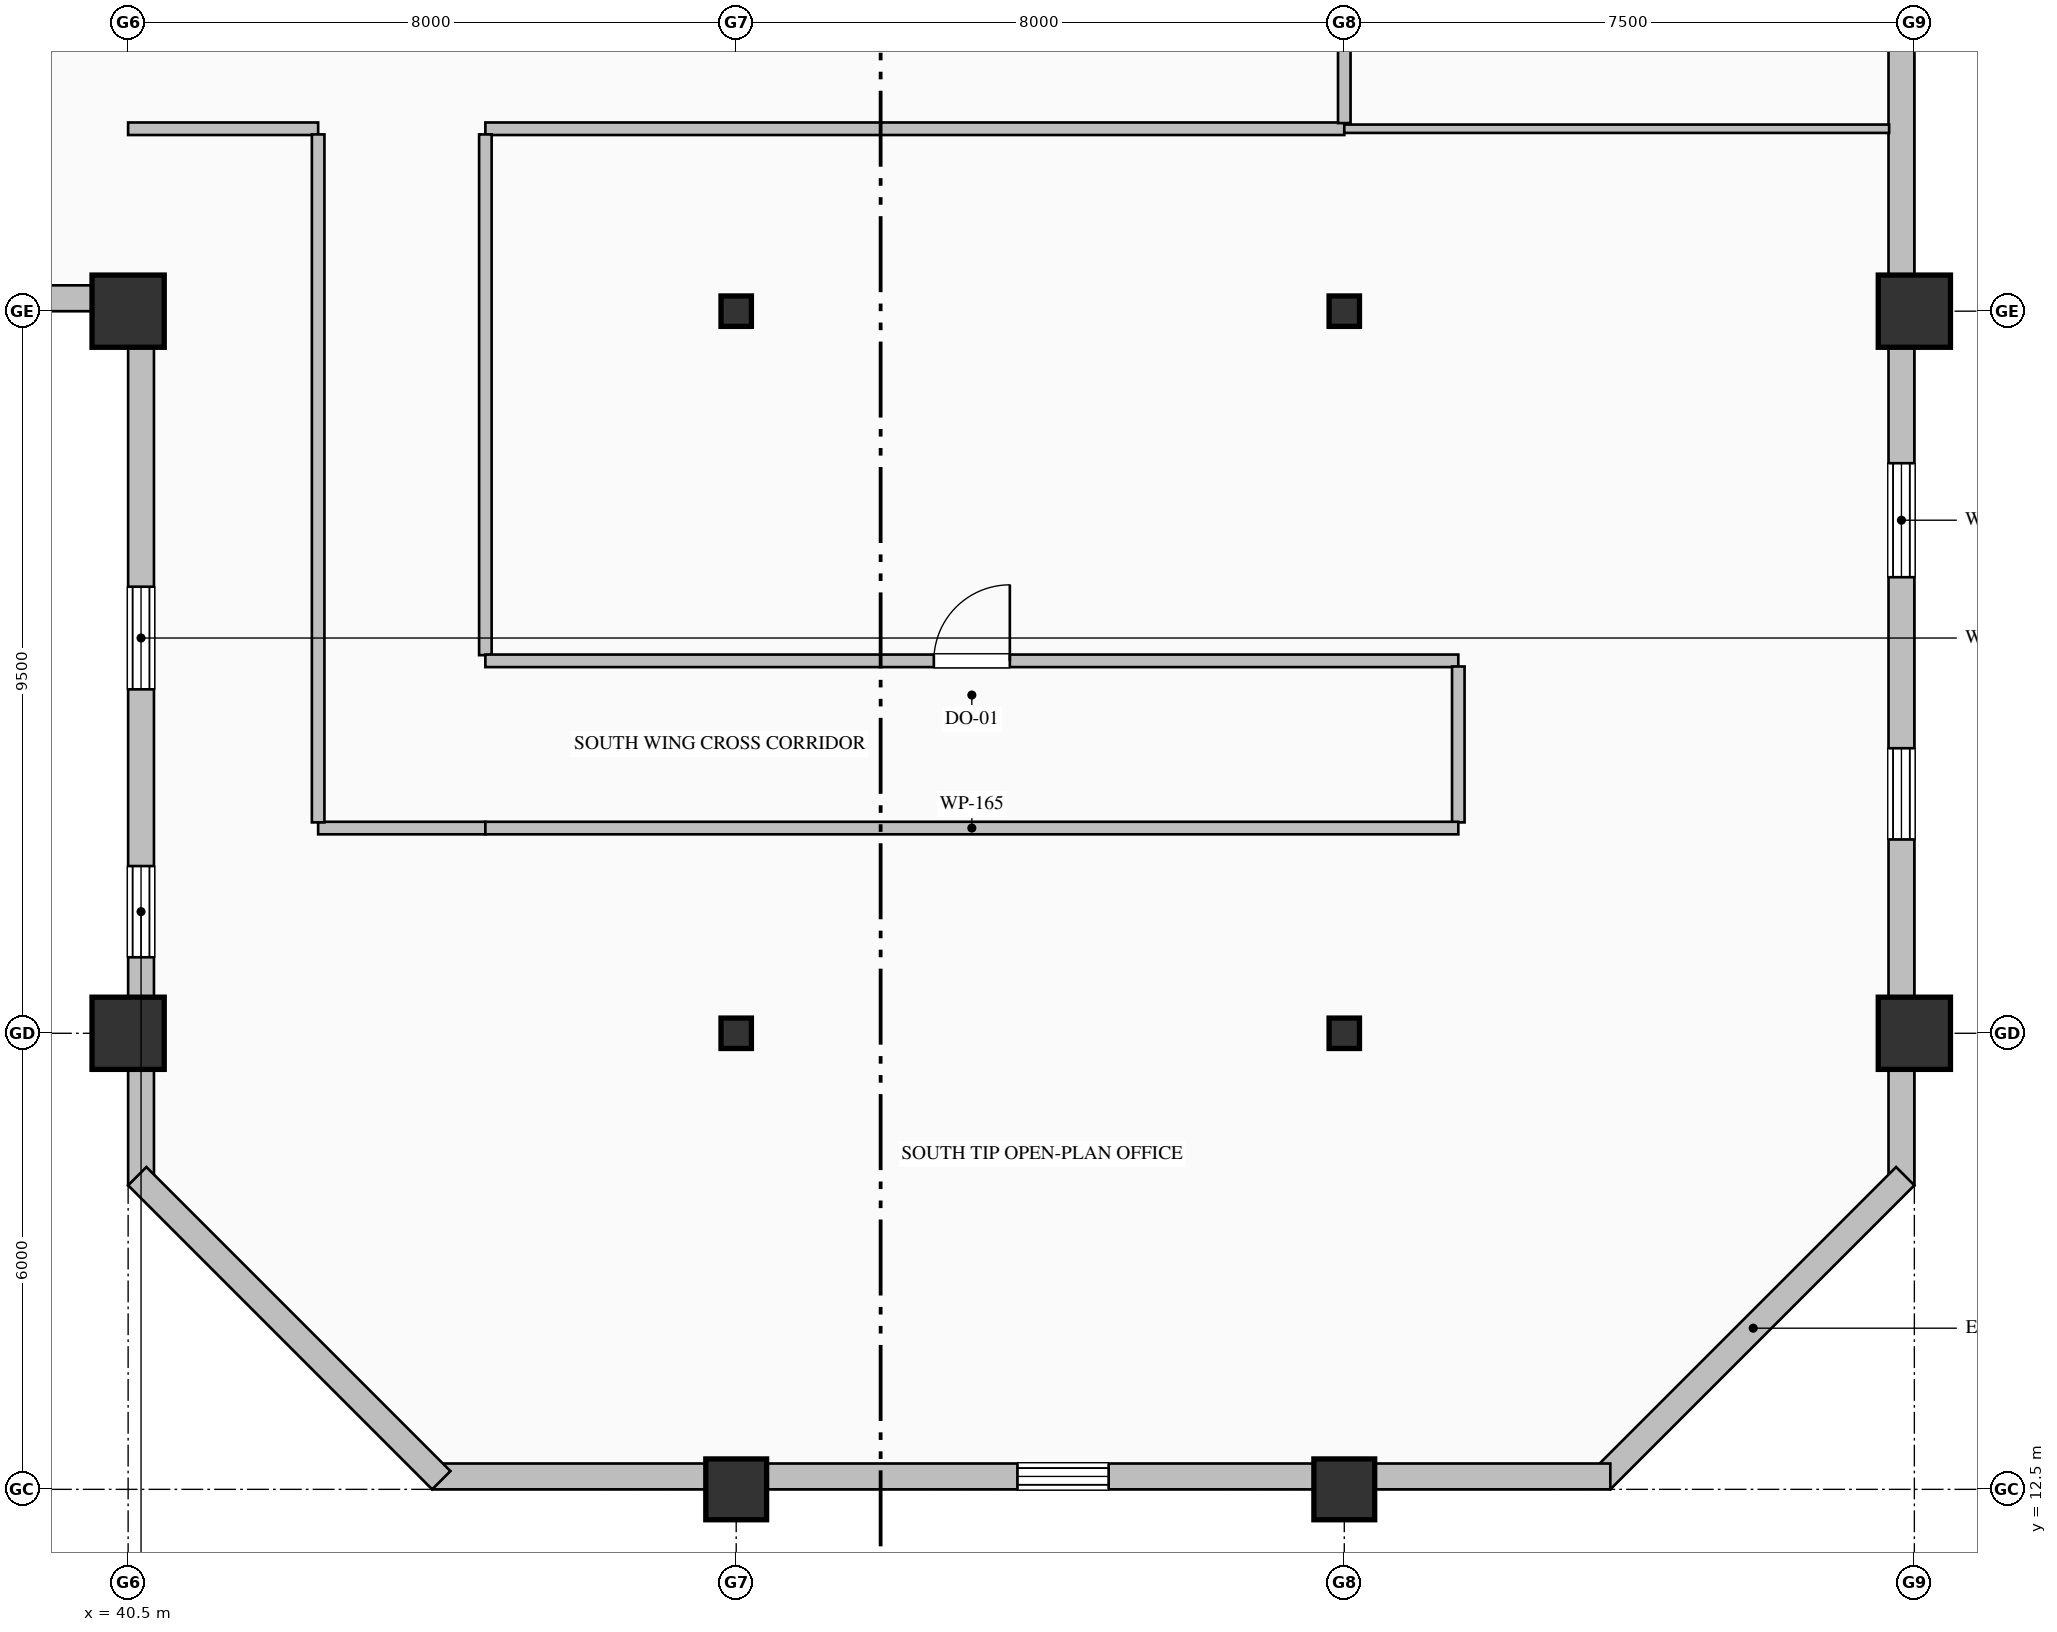
"""IFC4 building model, lengths in metres.
Left out: names, types, materials, properties, quantities, classifications, styles, units other than length and angle.
Written with IfcOpenShell. Run it as: python <this file> out.ifc"""

import sys

from ifc_helpers import new_model, si_unit, direction, frame, frame_2d, origin, origin_2d, place, context, subcontext, project, spatial, rectangle, hollow_rectangle, i_section, extrude, element, fill, save


model = new_model("IFC4")
c1 = context("Model", 3, precision=1e-05, world=origin(), true_north=direction((0.0, 1.0)))
c2 = subcontext(c1, "Body", "Model", "MODEL_VIEW")
j1 = project(units=[si_unit("LENGTHUNIT", "METRE"), si_unit("PLANEANGLEUNIT", "RADIAN")], contexts=[c1])
p1 = place(None, origin())
s1 = spatial("IfcSite", under=j1, at=p1, CompositionType="ELEMENT")
p2 = place(p1, origin())
s2 = spatial("IfcBuilding", under=s1, at=p2, CompositionType="ELEMENT")
p3 = place(p2, frame((0.0, 0.0, 261.8)))
s3 = spatial("IfcBuildingStorey", under=s2, at=p3, CompositionType="ELEMENT", Elevation=261.8)
for number, where, z_axis, x_axis in (
    (1, (40.5, 18.5, 0.0), (0.0, 0.0, 1.0), (1.0, 0.0, 0.0)),
    (2, (40.5, 28.0, 0.0), (0.0, 0.0, 1.0), (1.0, 0.0, 0.0)),
):
    element("IfcColumn", number, at=place(p3, frame(where, z_axis=z_axis, x_axis=x_axis)), inside=s3, PredefinedType="COLUMN", context=c2, shape_type="SweptSolid", body=[
        extrude(hollow_rectangle(XDim=0.95, YDim=0.95, WallThickness=0.036, at=origin_2d()), origin(), (0.0, 0.0, 1.0), 4.0),
    ])
p4 = place(p3, frame((48.5, 12.5, 0.0), z_axis=(0.0, 0.0, 1.0), x_axis=(1.0, 0.0, 0.0)))
e3 = element("IfcColumn", 3, at=p4, inside=s3, PredefinedType="COLUMN", context=c2, shape_type="SweptSolid", body=[
    extrude(hollow_rectangle(XDim=0.8, YDim=0.8, WallThickness=0.032, at=origin_2d()), origin(), (0.0, 0.0, 1.0), 4.0),
])
for number, where, z_axis, x_axis in (
    (4, (48.5, 18.5, 0.0), (0.0, 0.0, 1.0), (1.0, 0.0, 0.0)),
    (5, (48.5, 28.0, 0.0), (0.0, 0.0, 1.0), (1.0, 0.0, 0.0)),
):
    element("IfcColumn", number, at=place(p3, frame(where, z_axis=z_axis, x_axis=x_axis)), inside=s3, PredefinedType="COLUMN", context=c2, shape_type="SweptSolid", body=[
        extrude(i_section(OverallWidth=0.4, OverallDepth=0.4, WebThickness=0.013, FlangeThickness=0.021, FilletRadius=0.022, at=origin_2d()), origin(), (0.0, 0.0, 1.0), 4.0),
    ])
p5 = place(p3, frame((56.5, 12.5, 0.0), z_axis=(0.0, 0.0, 1.0), x_axis=(1.0, 0.0, 0.0)))
e6 = element("IfcColumn", 6, at=p5, inside=s3, PredefinedType="COLUMN", context=c2, shape_type="SweptSolid", body=[
    extrude(hollow_rectangle(XDim=0.8, YDim=0.8, WallThickness=0.032, at=origin_2d()), origin(), (0.0, 0.0, 1.0), 4.0),
])
for number, where, z_axis, x_axis in (
    (7, (56.5, 18.5, 0.0), (0.0, 0.0, 1.0), (1.0, 0.0, 0.0)),
    (8, (56.5, 28.0, 0.0), (0.0, 0.0, 1.0), (1.0, 0.0, 0.0)),
):
    element("IfcColumn", number, at=place(p3, frame(where, z_axis=z_axis, x_axis=x_axis)), inside=s3, PredefinedType="COLUMN", context=c2, shape_type="SweptSolid", body=[
        extrude(i_section(OverallWidth=0.4, OverallDepth=0.4, WebThickness=0.013, FlangeThickness=0.021, FilletRadius=0.022, at=origin_2d()), origin(), (0.0, 0.0, 1.0), 4.0),
    ])
for number, where, z_axis, x_axis in (
    (9, (64.0, 18.5, 0.0), (0.0, 0.0, 1.0), (1.0, 0.0, 0.0)),
    (10, (64.0, 28.0, 0.0), (0.0, 0.0, 1.0), (1.0, 0.0, 0.0)),
):
    element("IfcColumn", number, at=place(p3, frame(where, z_axis=z_axis, x_axis=x_axis)), inside=s3, PredefinedType="COLUMN", context=c2, shape_type="SweptSolid", body=[
        extrude(hollow_rectangle(XDim=0.95, YDim=0.95, WallThickness=0.036, at=origin_2d()), origin(), (0.0, 0.0, 1.0), 4.0),
    ])
p6 = place(p3, frame((40.67, 16.5, 0.0), z_axis=(0.0, 0.0, 1.0), x_axis=(0.0, 1.0, 0.0)))
e11 = element("IfcWall", 11, at=p6, inside=s3, PredefinedType="SOLIDWALL", context=c2, shape_type="SweptSolid", body=[
    extrude(rectangle(XDim=11.84, YDim=0.34, at=frame_2d((5.92, 0.0))), origin(), (0.0, 0.0, 1.0), 3.187),
])
p7 = place(p6, frame((3.0, 0.0, 0.9)))
e12 = element("IfcOpeningElement", 12, at=p7, cuts=e11, PredefinedType="OPENING", context=c2, shape_type="SweptSolid", body=[
    extrude(rectangle(XDim=1.2, YDim=1.85, at=frame_2d((0.6, 0.925))), frame((0.0, 0.18, 0.0), z_axis=(0.0, -1.0, 0.0), x_axis=(1.0, 0.0, 0.0)), (0.0, 0.0, 1.0), 0.36),
])
p8 = place(p6, frame((6.525, 0.0, 0.9)))
e13 = element("IfcOpeningElement", 13, at=p8, cuts=e11, PredefinedType="OPENING", context=c2, shape_type="SweptSolid", body=[
    extrude(rectangle(XDim=1.35, YDim=1.85, at=frame_2d((0.675, 0.925))), frame((0.0, 0.18, 0.0), z_axis=(0.0, -1.0, 0.0), x_axis=(1.0, 0.0, 0.0)), (0.0, 0.0, 1.0), 0.36),
])
p9 = place(p3, frame((40.52, 28.17, 0.0), z_axis=(0.0, 0.0, 1.0), x_axis=(-1.0, 0.0, 0.0)))
e14 = element("IfcWall", 14, at=p9, inside=s3, PredefinedType="SOLIDWALL", context=c2, shape_type="SweptSolid", body=[
    extrude(rectangle(XDim=27.52, YDim=0.34, at=frame_2d((13.76, 0.0))), origin(), (0.0, 0.0, 1.0), 3.187),
])
p10 = place(p9, frame((10.2, 0.0, 0.9)))
e15 = element("IfcOpeningElement", 15, at=p10, cuts=e14, PredefinedType="OPENING", context=c2, shape_type="SweptSolid", body=[
    extrude(rectangle(XDim=1.2, YDim=1.85, at=frame_2d((0.6, 0.925))), frame((0.0, 0.18, 0.0), z_axis=(0.0, -1.0, 0.0), x_axis=(1.0, 0.0, 0.0)), (0.0, 0.0, 1.0), 0.36),
])
p11 = place(p9, frame((13.725, 0.0, 0.9)))
e16 = element("IfcOpeningElement", 16, at=p11, cuts=e14, PredefinedType="OPENING", context=c2, shape_type="SweptSolid", body=[
    extrude(rectangle(XDim=1.35, YDim=1.85, at=frame_2d((0.675, 0.925))), frame((0.0, 0.18, 0.0), z_axis=(0.0, -1.0, 0.0), x_axis=(1.0, 0.0, 0.0)), (0.0, 0.0, 1.0), 0.36),
])
p12 = place(p9, frame((17.4, 0.0, 0.7)))
e17 = element("IfcOpeningElement", 17, at=p12, cuts=e14, PredefinedType="OPENING", context=c2, shape_type="SweptSolid", body=[
    extrude(rectangle(XDim=1.2, YDim=1.85, at=frame_2d((0.6, 0.925))), frame((0.0, 0.18, 0.0), z_axis=(0.0, -1.0, 0.0), x_axis=(1.0, 0.0, 0.0)), (0.0, 0.0, 1.0), 0.36),
])
p13 = place(p9, frame((21.0, 0.0, 0.9)))
e18 = element("IfcOpeningElement", 18, at=p13, cuts=e14, PredefinedType="OPENING", context=c2, shape_type="SweptSolid", body=[
    extrude(rectangle(XDim=1.2, YDim=1.85, at=frame_2d((0.6, 0.925))), frame((0.0, 0.18, 0.0), z_axis=(0.0, -1.0, 0.0), x_axis=(1.0, 0.0, 0.0)), (0.0, 0.0, 1.0), 0.36),
])
p14 = place(p3, frame((63.83, 36.05, 0.0), z_axis=(0.0, 0.0, 1.0), x_axis=(0.0, -1.0, 0.0)))
e19 = element("IfcWall", 19, at=p14, inside=s3, PredefinedType="SOLIDWALL", context=c2, shape_type="SweptSolid", body=[
    extrude(rectangle(XDim=19.55, YDim=0.34, at=frame_2d((9.775, 0.0))), origin(), (0.0, 0.0, 1.0), 3.325),
])
p15 = place(p14, frame((3.0, 0.0, 0.9)))
e20 = element("IfcOpeningElement", 20, at=p15, cuts=e19, PredefinedType="OPENING", context=c2, shape_type="SweptSolid", body=[
    extrude(rectangle(XDim=1.2, YDim=1.85, at=frame_2d((0.6, 0.925))), frame((0.0, 0.18, 0.0), z_axis=(0.0, -1.0, 0.0), x_axis=(1.0, 0.0, 0.0)), (0.0, 0.0, 1.0), 0.36),
])
p16 = place(p14, frame((10.05, 0.0, 0.7)))
e21 = element("IfcOpeningElement", 21, at=p16, cuts=e19, PredefinedType="OPENING", context=c2, shape_type="SweptSolid", body=[
    extrude(rectangle(XDim=1.5, YDim=2.4, at=frame_2d((0.75, 1.2))), frame((0.0, 0.18, 0.0), z_axis=(0.0, -1.0, 0.0), x_axis=(1.0, 0.0, 0.0)), (0.0, 0.0, 1.0), 0.36),
])
p17 = place(p14, frame((13.8, 0.0, 0.9)))
e22 = element("IfcOpeningElement", 22, at=p17, cuts=e19, PredefinedType="OPENING", context=c2, shape_type="SweptSolid", body=[
    extrude(rectangle(XDim=1.2, YDim=1.85, at=frame_2d((0.6, 0.925))), frame((0.0, 0.18, 0.0), z_axis=(0.0, -1.0, 0.0), x_axis=(1.0, 0.0, 0.0)), (0.0, 0.0, 1.0), 0.36),
])
p18 = place(p3, frame((63.88, 16.62, 0.0), z_axis=(0.0, 0.0, 1.0), x_axis=(-0.707106781187, -0.707106781187, 0.0)))
e23 = element("IfcWall", 23, at=p18, inside=s3, PredefinedType="SOLIDWALL", context=c2, shape_type="SweptSolid", body=[
    extrude(rectangle(XDim=5.657, YDim=0.34, at=frame_2d((2.828, 0.0))), origin(), (0.0, 0.0, 1.0), 3.775),
])
p19 = place(p3, frame((60.0, 12.67, 0.0), z_axis=(0.0, 0.0, 1.0), x_axis=(-1.0, 0.0, 0.0)))
e24 = element("IfcWall", 24, at=p19, inside=s3, PredefinedType="SOLIDWALL", context=c2, shape_type="SweptSolid", body=[
    extrude(rectangle(XDim=15.5, YDim=0.34, at=frame_2d((7.75, 0.0))), origin(), (0.0, 0.0, 1.0), 3.325),
])
p20 = place(p19, frame((6.6, 0.0, 0.9)))
e25 = element("IfcOpeningElement", 25, at=p20, cuts=e24, PredefinedType="OPENING", context=c2, shape_type="SweptSolid", body=[
    extrude(rectangle(XDim=1.2, YDim=1.85, at=frame_2d((0.6, 0.925))), frame((0.0, 0.18, 0.0), z_axis=(0.0, -1.0, 0.0), x_axis=(1.0, 0.0, 0.0)), (0.0, 0.0, 1.0), 0.36),
])
p21 = place(p3, frame((44.62, 12.62, 0.0), z_axis=(0.0, 0.0, 1.0), x_axis=(-0.707106781187, 0.707106781187, 0.0)))
e26 = element("IfcWall", 26, at=p21, inside=s3, PredefinedType="SOLIDWALL", context=c2, shape_type="SweptSolid", body=[
    extrude(rectangle(XDim=5.657, YDim=0.34, at=frame_2d((2.828, 0.0))), origin(), (0.0, 0.0, 1.0), 3.775),
])
p22 = place(p3, frame((43.0, 30.4, 0.0), z_axis=(0.0, 0.0, 1.0), x_axis=(-1.0, 0.0, 0.0)))
e27 = element("IfcWall", 27, at=p22, inside=s3, PredefinedType="PARTITIONING", context=c2, shape_type="SweptSolid", body=[
    extrude(rectangle(XDim=2.5, YDim=0.165, at=frame_2d((1.25, 0.0))), origin(), (0.0, 0.0, 1.0), 3.775),
])
p23 = place(p3, frame((56.5, 30.4, 0.0), z_axis=(0.0, 0.0, 1.0), x_axis=(-1.0, 0.0, 0.0)))
e28 = element("IfcWall", 28, at=p23, inside=s3, PredefinedType="PARTITIONING", context=c2, shape_type="SweptSolid", body=[
    extrude(rectangle(XDim=11.3, YDim=0.165, at=frame_2d((5.65, 0.0))), origin(), (0.0, 0.0, 1.0), 3.775),
])
p24 = place(p3, frame((56.5, 36.0, 0.0), z_axis=(0.0, 0.0, 1.0), x_axis=(0.0, -1.0, 0.0)))
e29 = element("IfcWall", 29, at=p24, inside=s3, PredefinedType="PARTITIONING", context=c2, shape_type="SweptSolid", body=[
    extrude(rectangle(XDim=5.525, YDim=0.165, at=frame_2d((2.763, 0.0))), origin(), (0.0, 0.0, 1.0), 3.179),
])
p25 = place(p24, frame((2.263, 0.0, 0.0)))
e30 = element("IfcOpeningElement", 30, at=p25, cuts=e29, PredefinedType="OPENING", context=c2, shape_type="SweptSolid", body=[
    extrude(rectangle(XDim=1.0, YDim=2.15, at=frame_2d((0.5, 1.075))), frame((0.0, 0.093, 0.0), z_axis=(0.0, -1.0, 0.0), x_axis=(1.0, 0.0, 0.0)), (0.0, 0.0, 1.0), 0.185),
])
p26 = place(p3, frame((45.2, 21.2, 0.0), z_axis=(0.0, 0.0, 1.0), x_axis=(-1.0, 0.0, 0.0)))
e31 = element("IfcWall", 31, at=p26, inside=s3, PredefinedType="PARTITIONING", context=c2, shape_type="SweptSolid", body=[
    extrude(rectangle(XDim=2.2, YDim=0.165, at=frame_2d((1.1, 0.0))), origin(), (0.0, 0.0, 1.0), 3.775),
])
p27 = place(p3, frame((43.0, 21.274, 0.0), z_axis=(0.0, 0.0, 1.0), x_axis=(0.0, 1.0, 0.0)))
e32 = element("IfcWall", 32, at=p27, inside=s3, PredefinedType="PARTITIONING", context=c2, shape_type="SweptSolid", body=[
    extrude(rectangle(XDim=9.051, YDim=0.165, at=frame_2d((4.525, 0.0))), origin(), (0.0, 0.0, 1.0), 3.775),
])
p28 = place(p3, frame((45.2, 30.325, 0.0), z_axis=(0.0, 0.0, 1.0), x_axis=(0.0, -1.0, 0.0)))
e33 = element("IfcWall", 33, at=p28, inside=s3, PredefinedType="PARTITIONING", context=c2, shape_type="SweptSolid", body=[
    extrude(rectangle(XDim=6.851, YDim=0.165, at=frame_2d((3.425, 0.0))), origin(), (0.0, 0.0, 1.0), 3.775),
])
p29 = place(p3, frame((45.2, 23.4, 0.0), z_axis=(0.0, 0.0, 1.0), x_axis=(1.0, 0.0, 0.0)))
e34 = element("IfcWall", 34, at=p29, inside=s3, PredefinedType="PARTITIONING", context=c2, shape_type="SweptSolid", body=[
    extrude(rectangle(XDim=12.8, YDim=0.165, at=frame_2d((6.4, 0.0))), origin(), (0.0, 0.0, 1.0), 3.467),
])
p30 = place(p29, frame((5.9, 0.0, 0.0)))
e35 = element("IfcOpeningElement", 35, at=p30, cuts=e34, PredefinedType="OPENING", context=c2, shape_type="SweptSolid", body=[
    extrude(rectangle(XDim=1.0, YDim=2.15, at=frame_2d((0.5, 1.075))), frame((0.0, 0.093, 0.0), z_axis=(0.0, -1.0, 0.0), x_axis=(1.0, 0.0, 0.0)), (0.0, 0.0, 1.0), 0.185),
])
p31 = place(p3, frame((58.0, 23.325, 0.0), z_axis=(0.0, 0.0, 1.0), x_axis=(0.0, -1.0, 0.0)))
e36 = element("IfcWall", 36, at=p31, inside=s3, PredefinedType="PARTITIONING", context=c2, shape_type="SweptSolid", body=[
    extrude(rectangle(XDim=2.051, YDim=0.165, at=frame_2d((1.025, 0.0))), origin(), (0.0, 0.0, 1.0), 3.775),
])
p32 = place(p3, frame((58.0, 21.2, 0.0), z_axis=(0.0, 0.0, 1.0), x_axis=(-1.0, 0.0, 0.0)))
e37 = element("IfcWall", 37, at=p32, inside=s3, PredefinedType="PARTITIONING", context=c2, shape_type="SweptSolid", body=[
    extrude(rectangle(XDim=12.8, YDim=0.165, at=frame_2d((6.4, 0.0))), origin(), (0.0, 0.0, 1.0), 3.775),
])
p33 = place(p3, frame((56.5, 30.4, 0.0), z_axis=(0.0, 0.0, 1.0), x_axis=(1.0, 0.0, 0.0)))
e38 = element("IfcWall", 38, at=p33, inside=s3, PredefinedType="MOVABLE", context=c2, shape_type="SweptSolid", body=[
    extrude(rectangle(XDim=7.168, YDim=0.11, at=frame_2d((3.584, 0.0))), origin(), (0.0, 0.0, 1.0), 3.775),
])
p34 = place(p7, origin())
e39 = element("IfcWindow", 39, at=p34, inside=s3, PartitioningType="DOUBLE_PANEL_VERTICAL", PredefinedType="WINDOW", context=c2, shape_type="SweptSolid", body=[
    extrude(rectangle(XDim=1.2, YDim=1.85, at=frame_2d((0.6, 0.925))), frame((0.0, 0.15, 0.0), z_axis=(0.0, -1.0, 0.0), x_axis=(1.0, 0.0, 0.0)), (0.0, 0.0, 1.0), 0.06),
])
fill(e12, e39)
p35 = place(p8, origin())
e40 = element("IfcWindow", 40, at=p35, inside=s3, PartitioningType="DOUBLE_PANEL_VERTICAL", PredefinedType="WINDOW", context=c2, shape_type="SweptSolid", body=[
    extrude(rectangle(XDim=1.35, YDim=1.85, at=frame_2d((0.675, 0.925))), frame((0.0, 0.15, 0.0), z_axis=(0.0, -1.0, 0.0), x_axis=(1.0, 0.0, 0.0)), (0.0, 0.0, 1.0), 0.06),
])
fill(e13, e40)
p36 = place(p16, origin())
e41 = element("IfcWindow", 41, at=p36, inside=s3, PartitioningType="DOUBLE_PANEL_HORIZONTAL", PredefinedType="WINDOW", context=c2, shape_type="SweptSolid", body=[
    extrude(rectangle(XDim=1.5, YDim=2.4, at=frame_2d((0.75, 1.2))), frame((0.0, 0.15, 0.0), z_axis=(0.0, -1.0, 0.0), x_axis=(1.0, 0.0, 0.0)), (0.0, 0.0, 1.0), 0.06),
])
fill(e21, e41)
p37 = place(p17, origin())
e42 = element("IfcWindow", 42, at=p37, inside=s3, PartitioningType="DOUBLE_PANEL_VERTICAL", PredefinedType="WINDOW", context=c2, shape_type="SweptSolid", body=[
    extrude(rectangle(XDim=1.2, YDim=1.85, at=frame_2d((0.6, 0.925))), frame((0.0, 0.15, 0.0), z_axis=(0.0, -1.0, 0.0), x_axis=(1.0, 0.0, 0.0)), (0.0, 0.0, 1.0), 0.06),
])
fill(e22, e42)
p38 = place(p20, origin())
e43 = element("IfcWindow", 43, at=p38, inside=s3, PartitioningType="DOUBLE_PANEL_VERTICAL", PredefinedType="WINDOW", context=c2, shape_type="SweptSolid", body=[
    extrude(rectangle(XDim=1.2, YDim=1.85, at=frame_2d((0.6, 0.925))), frame((0.0, 0.15, 0.0), z_axis=(0.0, -1.0, 0.0), x_axis=(1.0, 0.0, 0.0)), (0.0, 0.0, 1.0), 0.06),
])
fill(e25, e43)
p39 = place(p30, origin())
e44 = element("IfcDoor", 44, at=p39, inside=s3, OperationType="SINGLE_SWING_RIGHT", PredefinedType="DOOR", context=c2, shape_type="SweptSolid", body=[
    extrude(rectangle(XDim=1.0, YDim=2.15, at=frame_2d((0.5, 1.075))), frame((0.0, 0.025, 0.0), z_axis=(0.0, -1.0, 0.0), x_axis=(1.0, 0.0, 0.0)), (0.0, 0.0, 1.0), 0.05),
])
fill(e35, e44)
save(model, sys.argv[1])
